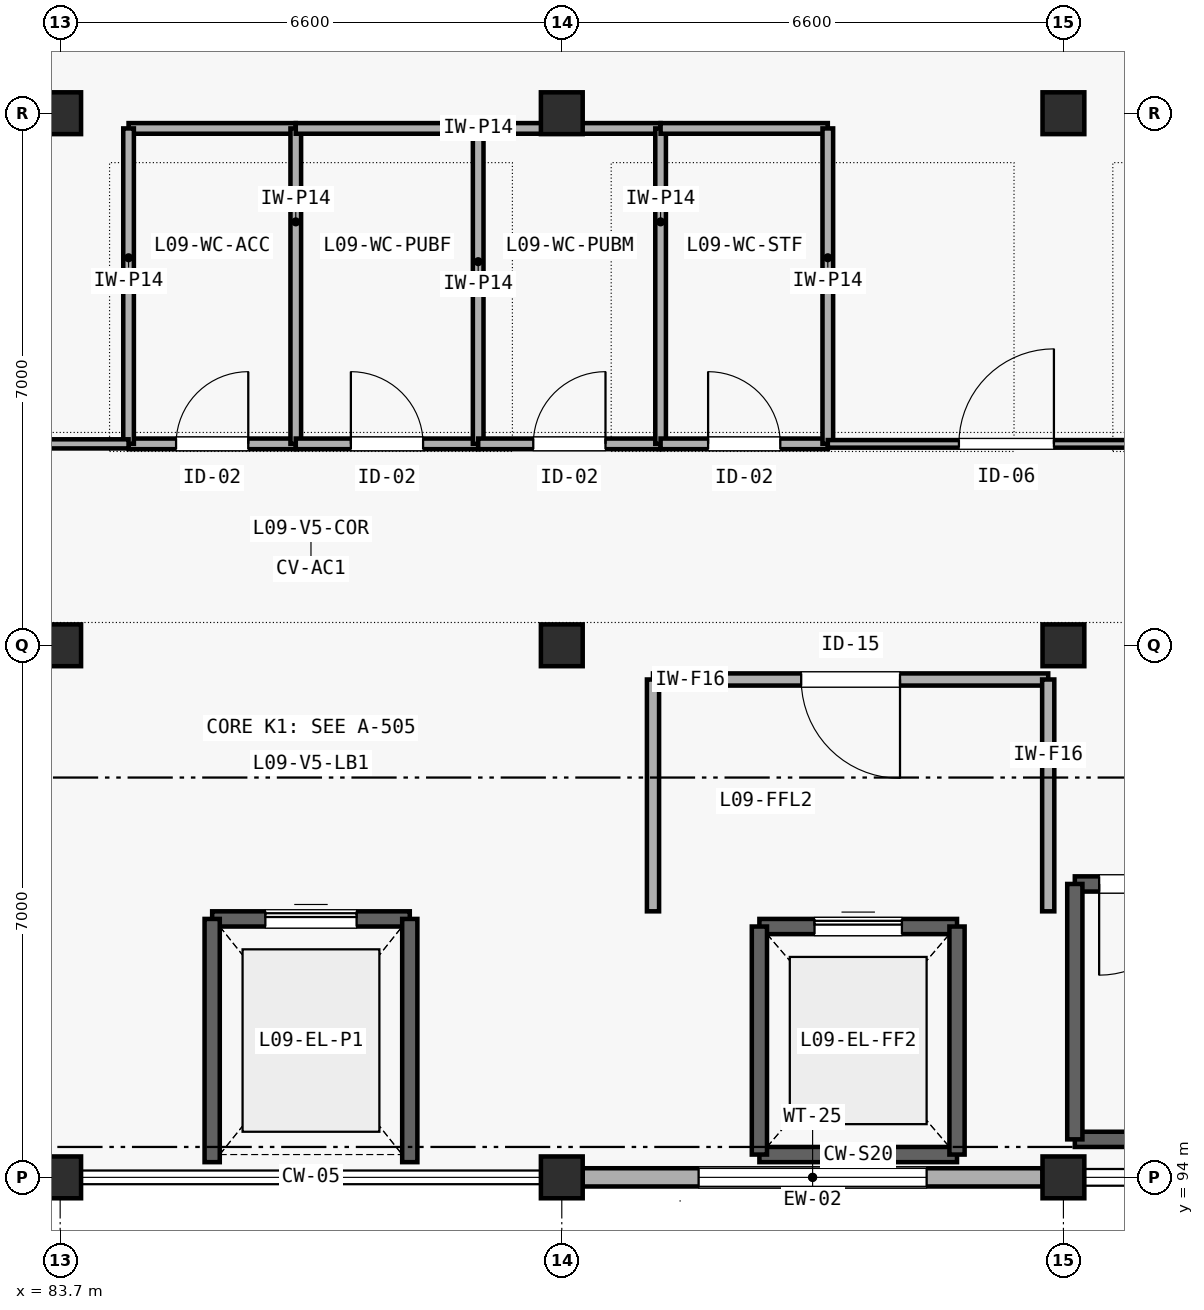
"""IFC4 building model, lengths in metres.
Left out: names, types, materials, properties, quantities, classifications, styles, units other than length and angle.
Written with IfcOpenShell. Run it as: python <this file> out.ifc"""

import sys

from ifc_helpers import new_model, si_unit, direction, frame, frame_2d, origin, origin_2d, place, context, subcontext, project, spatial, rectangle, extrude, element, fill, save


model = new_model("IFC4")
c1 = context("Model", 3, precision=1e-05, world=origin(), true_north=direction((0.0, 1.0)))
c2 = subcontext(c1, "Body", "Model", "MODEL_VIEW")
j1 = project(units=[si_unit("LENGTHUNIT", "METRE"), si_unit("PLANEANGLEUNIT", "RADIAN")], contexts=[c1])
p1 = place(None, origin())
s1 = spatial("IfcSite", under=j1, at=p1, CompositionType="ELEMENT")
p2 = place(p1, origin())
s2 = spatial("IfcBuilding", under=s1, at=p2, CompositionType="ELEMENT")
p3 = place(p2, frame((0.0, 0.0, 37.8)))
s3 = spatial("IfcBuildingStorey", under=s2, at=p3, CompositionType="ELEMENT", Elevation=37.8)
for number, where, z_axis, x_axis in (
    (1, (83.7, 94.0, 0.0), (0.0, 0.0, 1.0), (1.0, 0.0, 0.0)),
    (2, (83.7, 101.0, 0.0), (0.0, 0.0, 1.0), (1.0, 0.0, 0.0)),
    (3, (83.7, 108.0, 0.0), (0.0, 0.0, 1.0), (1.0, 0.0, 0.0)),
    (4, (90.3, 94.0, 0.0), (0.0, 0.0, 1.0), (1.0, 0.0, 0.0)),
    (5, (90.3, 101.0, 0.0), (0.0, 0.0, 1.0), (1.0, 0.0, 0.0)),
    (6, (90.3, 108.0, 0.0), (0.0, 0.0, 1.0), (1.0, 0.0, 0.0)),
    (7, (96.9, 94.0, 0.0), (0.0, 0.0, 1.0), (1.0, 0.0, 0.0)),
    (8, (96.9, 101.0, 0.0), (0.0, 0.0, 1.0), (1.0, 0.0, 0.0)),
    (9, (96.9, 108.0, 0.0), (0.0, 0.0, 1.0), (1.0, 0.0, 0.0)),
):
    element("IfcColumn", number, at=place(p3, frame(where, z_axis=z_axis, x_axis=x_axis)), inside=s3, PredefinedType="COLUMN", context=c2, shape_type="SweptSolid", body=[
        extrude(rectangle(XDim=0.55, YDim=0.55, at=origin_2d()), origin(), (0.0, 0.0, 1.0), 4.2),
    ])
p4 = place(p3, frame((90.575, 94.0, 0.0), z_axis=(0.0, 0.0, 1.0), x_axis=(1.0, 0.0, 0.0)))
e10 = element("IfcWall", 10, at=p4, inside=s3, PredefinedType="SOLIDWALL", context=c2, shape_type="SweptSolid", body=[
    extrude(rectangle(XDim=6.05, YDim=0.24, at=frame_2d((3.025, 0.0))), origin(), (0.0, 0.0, 1.0), 3.385),
])
p5 = place(p4, frame((1.525, 0.0, 0.85)))
e11 = element("IfcOpeningElement", 11, at=p5, cuts=e10, PredefinedType="OPENING", context=c2, shape_type="SweptSolid", body=[
    extrude(rectangle(XDim=3.0, YDim=1.6, at=frame_2d((1.5, 0.8))), frame((0.0, 0.13, 0.0), z_axis=(0.0, -1.0, 0.0), x_axis=(1.0, 0.0, 0.0)), (0.0, 0.0, 1.0), 0.26),
])
p6 = place(p3, frame((97.05, 94.5, 0.0), z_axis=(0.0, 0.0, 1.0), x_axis=(1.0, 0.0, 0.0)))
e12 = element("IfcWall", 12, at=p6, inside=s3, PredefinedType="SHEAR", context=c2, shape_type="SweptSolid", body=[
    extrude(rectangle(XDim=6.3, YDim=0.2, at=frame_2d((3.15, 0.0))), origin(), (0.0, 0.0, 1.0), 4.2),
])
p7 = place(p3, frame((97.05, 97.86, 0.0), z_axis=(0.0, 0.0, 1.0), x_axis=(1.0, 0.0, 0.0)))
e13 = element("IfcWall", 13, at=p7, inside=s3, PredefinedType="SHEAR", context=c2, shape_type="SweptSolid", body=[
    extrude(rectangle(XDim=6.3, YDim=0.2, at=frame_2d((3.15, 0.0))), origin(), (0.0, 0.0, 1.0), 4.2),
])
p8 = place(p7, frame((0.32, 0.0, 0.0)))
e14 = element("IfcOpeningElement", 14, at=p8, cuts=e13, PredefinedType="OPENING", context=c2, shape_type="SweptSolid", body=[
    extrude(rectangle(XDim=1.2, YDim=2.15, at=frame_2d((0.6, 1.075))), frame((0.0, 0.11, 0.0), z_axis=(0.0, -1.0, 0.0), x_axis=(1.0, 0.0, 0.0)), (0.0, 0.0, 1.0), 0.22),
])
p9 = place(p3, frame((97.05, 94.5, 0.0), z_axis=(0.0, 0.0, 1.0), x_axis=(0.0, 1.0, 0.0)))
e15 = element("IfcWall", 15, at=p9, inside=s3, PredefinedType="SHEAR", context=c2, shape_type="SweptSolid", body=[
    extrude(rectangle(XDim=3.36, YDim=0.2, at=frame_2d((1.68, 0.0))), origin(), (0.0, 0.0, 1.0), 4.2),
])
p10 = place(p3, frame((92.9, 94.3, 0.0), z_axis=(0.0, 0.0, 1.0), x_axis=(1.0, 0.0, 0.0)))
e16 = element("IfcWall", 16, at=p10, inside=s3, PredefinedType="SHEAR", context=c2, shape_type="SweptSolid", body=[
    extrude(rectangle(XDim=2.6, YDim=0.2, at=frame_2d((1.3, 0.0))), origin(), (0.0, 0.0, 1.0), 4.2),
])
p11 = place(p3, frame((92.9, 97.3, 0.0), z_axis=(0.0, 0.0, 1.0), x_axis=(1.0, 0.0, 0.0)))
e17 = element("IfcWall", 17, at=p11, inside=s3, PredefinedType="SHEAR", context=c2, shape_type="SweptSolid", body=[
    extrude(rectangle(XDim=2.6, YDim=0.2, at=frame_2d((1.3, 0.0))), origin(), (0.0, 0.0, 1.0), 4.2),
])
p12 = place(p11, frame((0.725, 0.0, 0.0)))
e18 = element("IfcOpeningElement", 18, at=p12, cuts=e17, PredefinedType="OPENING", context=c2, shape_type="SweptSolid", body=[
    extrude(rectangle(XDim=1.15, YDim=2.2, at=frame_2d((0.575, 1.1))), frame((0.0, 0.11, 0.0), z_axis=(0.0, -1.0, 0.0), x_axis=(1.0, 0.0, 0.0)), (0.0, 0.0, 1.0), 0.22),
])
for number, where, z_axis, x_axis in (
    (19, (92.9, 94.3, 0.0), (0.0, 0.0, 1.0), (0.0, 1.0, 0.0)),
    (20, (95.5, 94.3, 0.0), (0.0, 0.0, 1.0), (0.0, 1.0, 0.0)),
):
    element("IfcWall", number, at=place(p3, frame(where, z_axis=z_axis, x_axis=x_axis)), inside=s3, PredefinedType="SHEAR", context=c2, shape_type="SweptSolid", body=[
        extrude(rectangle(XDim=3.0, YDim=0.2, at=frame_2d((1.5, 0.0))), origin(), (0.0, 0.0, 1.0), 4.2),
    ])
p13 = place(p3, frame((85.7, 97.4, 0.0), z_axis=(0.0, 0.0, 1.0), x_axis=(1.0, 0.0, 0.0)))
e21 = element("IfcWall", 21, at=p13, inside=s3, PredefinedType="SHEAR", context=c2, shape_type="SweptSolid", body=[
    extrude(rectangle(XDim=2.6, YDim=0.2, at=frame_2d((1.3, 0.0))), origin(), (0.0, 0.0, 1.0), 4.2),
])
p14 = place(p13, frame((0.7, 0.0, 0.0)))
e22 = element("IfcOpeningElement", 22, at=p14, cuts=e21, PredefinedType="OPENING", context=c2, shape_type="SweptSolid", body=[
    extrude(rectangle(XDim=1.2, YDim=2.2, at=frame_2d((0.6, 1.1))), frame((0.0, 0.11, 0.0), z_axis=(0.0, -1.0, 0.0), x_axis=(1.0, 0.0, 0.0)), (0.0, 0.0, 1.0), 0.22),
])
for number, where, z_axis, x_axis in (
    (23, (85.7, 94.2, 0.0), (0.0, 0.0, 1.0), (0.0, 1.0, 0.0)),
    (24, (88.3, 94.2, 0.0), (0.0, 0.0, 1.0), (0.0, 1.0, 0.0)),
):
    element("IfcWall", number, at=place(p3, frame(where, z_axis=z_axis, x_axis=x_axis)), inside=s3, PredefinedType="SHEAR", context=c2, shape_type="SweptSolid", body=[
        extrude(rectangle(XDim=3.2, YDim=0.2, at=frame_2d((1.6, 0.0))), origin(), (0.0, 0.0, 1.0), 4.2),
    ])
p15 = place(p3, frame((91.5, 100.55, 0.0), z_axis=(0.0, 0.0, 1.0), x_axis=(1.0, 0.0, 0.0)))
e25 = element("IfcWall", 25, at=p15, inside=s3, PredefinedType="SOLIDWALL", context=c2, shape_type="SweptSolid", body=[
    extrude(rectangle(XDim=5.2, YDim=0.16, at=frame_2d((2.6, 0.0))), origin(), (0.0, 0.0, 1.0), 3.9),
])
p16 = place(p15, frame((1.95, 0.0, 0.0)))
e26 = element("IfcOpeningElement", 26, at=p16, cuts=e25, PredefinedType="OPENING", context=c2, shape_type="SweptSolid", body=[
    extrude(rectangle(XDim=1.3, YDim=2.15, at=frame_2d((0.65, 1.075))), frame((0.0, 0.09, 0.0), z_axis=(0.0, -1.0, 0.0), x_axis=(1.0, 0.0, 0.0)), (0.0, 0.0, 1.0), 0.18),
])
p17 = place(p3, frame((91.5, 97.5, 0.0), z_axis=(0.0, 0.0, 1.0), x_axis=(0.0, 1.0, 0.0)))
e27 = element("IfcWall", 27, at=p17, inside=s3, PredefinedType="SOLIDWALL", context=c2, shape_type="SweptSolid", body=[
    extrude(rectangle(XDim=3.05, YDim=0.16, at=frame_2d((1.525, 0.0))), origin(), (0.0, 0.0, 1.0), 3.9),
])
p18 = place(p3, frame((96.7, 97.5, 0.0), z_axis=(0.0, 0.0, 1.0), x_axis=(0.0, 1.0, 0.0)))
e28 = element("IfcWall", 28, at=p18, inside=s3, PredefinedType="SOLIDWALL", context=c2, shape_type="SweptSolid", body=[
    extrude(rectangle(XDim=3.05, YDim=0.16, at=frame_2d((1.525, 0.0))), origin(), (0.0, 0.0, 1.0), 3.405),
])
p19 = place(p3, frame((84.6, 103.65, 0.0), z_axis=(0.0, 0.0, 1.0), x_axis=(1.0, 0.0, 0.0)))
e29 = element("IfcWall", 29, at=p19, inside=s3, PredefinedType="PLUMBINGWALL", context=c2, shape_type="SweptSolid", body=[
    extrude(rectangle(XDim=2.2, YDim=0.14, at=frame_2d((1.1, 0.0))), origin(), (0.0, 0.0, 1.0), 3.9),
])
p20 = place(p19, frame((0.625, 0.0, 0.0)))
e30 = element("IfcOpeningElement", 30, at=p20, cuts=e29, PredefinedType="OPENING", context=c2, shape_type="SweptSolid", body=[
    extrude(rectangle(XDim=0.95, YDim=2.1, at=frame_2d((0.475, 1.05))), frame((0.0, 0.08, 0.0), z_axis=(0.0, -1.0, 0.0), x_axis=(1.0, 0.0, 0.0)), (0.0, 0.0, 1.0), 0.16),
])
p21 = place(p3, frame((84.6, 107.8, 0.0), z_axis=(0.0, 0.0, 1.0), x_axis=(1.0, 0.0, 0.0)))
e31 = element("IfcWall", 31, at=p21, inside=s3, PredefinedType="PLUMBINGWALL", context=c2, shape_type="SweptSolid", body=[
    extrude(rectangle(XDim=2.2, YDim=0.14, at=frame_2d((1.1, 0.0))), origin(), (0.0, 0.0, 1.0), 3.385),
])
for number, where, z_axis, x_axis in (
    (32, (84.6, 103.65, 0.0), (0.0, 0.0, 1.0), (0.0, 1.0, 0.0)),
    (33, (86.8, 103.65, 0.0), (0.0, 0.0, 1.0), (0.0, 1.0, 0.0)),
):
    element("IfcWall", number, at=place(p3, frame(where, z_axis=z_axis, x_axis=x_axis)), inside=s3, PredefinedType="PLUMBINGWALL", context=c2, shape_type="SweptSolid", body=[
        extrude(rectangle(XDim=4.15, YDim=0.14, at=frame_2d((2.075, 0.0))), origin(), (0.0, 0.0, 1.0), 3.9),
    ])
p22 = place(p3, frame((86.8, 103.65, 0.0), z_axis=(0.0, 0.0, 1.0), x_axis=(1.0, 0.0, 0.0)))
e34 = element("IfcWall", 34, at=p22, inside=s3, PredefinedType="PLUMBINGWALL", context=c2, shape_type="SweptSolid", body=[
    extrude(rectangle(XDim=2.4, YDim=0.14, at=frame_2d((1.2, 0.0))), origin(), (0.0, 0.0, 1.0), 3.9),
])
p23 = place(p22, frame((0.725, 0.0, 0.0)))
e35 = element("IfcOpeningElement", 35, at=p23, cuts=e34, PredefinedType="OPENING", context=c2, shape_type="SweptSolid", body=[
    extrude(rectangle(XDim=0.95, YDim=2.1, at=frame_2d((0.475, 1.05))), frame((0.0, 0.08, 0.0), z_axis=(0.0, -1.0, 0.0), x_axis=(1.0, 0.0, 0.0)), (0.0, 0.0, 1.0), 0.16),
])
p24 = place(p3, frame((86.8, 107.8, 0.0), z_axis=(0.0, 0.0, 1.0), x_axis=(1.0, 0.0, 0.0)))
e36 = element("IfcWall", 36, at=p24, inside=s3, PredefinedType="PLUMBINGWALL", context=c2, shape_type="SweptSolid", body=[
    extrude(rectangle(XDim=2.4, YDim=0.14, at=frame_2d((1.2, 0.0))), origin(), (0.0, 0.0, 1.0), 3.385),
])
p25 = place(p3, frame((89.2, 103.65, 0.0), z_axis=(0.0, 0.0, 1.0), x_axis=(0.0, 1.0, 0.0)))
e37 = element("IfcWall", 37, at=p25, inside=s3, PredefinedType="PLUMBINGWALL", context=c2, shape_type="SweptSolid", body=[
    extrude(rectangle(XDim=4.15, YDim=0.14, at=frame_2d((2.075, 0.0))), origin(), (0.0, 0.0, 1.0), 3.9),
])
p26 = place(p3, frame((89.2, 103.65, 0.0), z_axis=(0.0, 0.0, 1.0), x_axis=(1.0, 0.0, 0.0)))
e38 = element("IfcWall", 38, at=p26, inside=s3, PredefinedType="PLUMBINGWALL", context=c2, shape_type="SweptSolid", body=[
    extrude(rectangle(XDim=2.4, YDim=0.14, at=frame_2d((1.2, 0.0))), origin(), (0.0, 0.0, 1.0), 3.9),
])
p27 = place(p26, frame((0.725, 0.0, 0.0)))
e39 = element("IfcOpeningElement", 39, at=p27, cuts=e38, PredefinedType="OPENING", context=c2, shape_type="SweptSolid", body=[
    extrude(rectangle(XDim=0.95, YDim=2.1, at=frame_2d((0.475, 1.05))), frame((0.0, 0.08, 0.0), z_axis=(0.0, -1.0, 0.0), x_axis=(1.0, 0.0, 0.0)), (0.0, 0.0, 1.0), 0.16),
])
p28 = place(p3, frame((89.2, 107.8, 0.0), z_axis=(0.0, 0.0, 1.0), x_axis=(1.0, 0.0, 0.0)))
e40 = element("IfcWall", 40, at=p28, inside=s3, PredefinedType="PLUMBINGWALL", context=c2, shape_type="SweptSolid", body=[
    extrude(rectangle(XDim=2.4, YDim=0.14, at=frame_2d((1.2, 0.0))), origin(), (0.0, 0.0, 1.0), 3.385),
])
p29 = place(p3, frame((91.6, 103.65, 0.0), z_axis=(0.0, 0.0, 1.0), x_axis=(0.0, 1.0, 0.0)))
e41 = element("IfcWall", 41, at=p29, inside=s3, PredefinedType="PLUMBINGWALL", context=c2, shape_type="SweptSolid", body=[
    extrude(rectangle(XDim=4.15, YDim=0.14, at=frame_2d((2.075, 0.0))), origin(), (0.0, 0.0, 1.0), 3.9),
])
p30 = place(p3, frame((91.6, 103.65, 0.0), z_axis=(0.0, 0.0, 1.0), x_axis=(1.0, 0.0, 0.0)))
e42 = element("IfcWall", 42, at=p30, inside=s3, PredefinedType="PLUMBINGWALL", context=c2, shape_type="SweptSolid", body=[
    extrude(rectangle(XDim=2.2, YDim=0.14, at=frame_2d((1.1, 0.0))), origin(), (0.0, 0.0, 1.0), 3.9),
])
p31 = place(p30, frame((0.625, 0.0, 0.0)))
e43 = element("IfcOpeningElement", 43, at=p31, cuts=e42, PredefinedType="OPENING", context=c2, shape_type="SweptSolid", body=[
    extrude(rectangle(XDim=0.95, YDim=2.1, at=frame_2d((0.475, 1.05))), frame((0.0, 0.08, 0.0), z_axis=(0.0, -1.0, 0.0), x_axis=(1.0, 0.0, 0.0)), (0.0, 0.0, 1.0), 0.16),
])
p32 = place(p3, frame((91.6, 107.8, 0.0), z_axis=(0.0, 0.0, 1.0), x_axis=(1.0, 0.0, 0.0)))
e44 = element("IfcWall", 44, at=p32, inside=s3, PredefinedType="PLUMBINGWALL", context=c2, shape_type="SweptSolid", body=[
    extrude(rectangle(XDim=2.2, YDim=0.14, at=frame_2d((1.1, 0.0))), origin(), (0.0, 0.0, 1.0), 3.385),
])
p33 = place(p3, frame((93.8, 103.65, 0.0), z_axis=(0.0, 0.0, 1.0), x_axis=(0.0, 1.0, 0.0)))
e45 = element("IfcWall", 45, at=p33, inside=s3, PredefinedType="PLUMBINGWALL", context=c2, shape_type="SweptSolid", body=[
    extrude(rectangle(XDim=4.15, YDim=0.14, at=frame_2d((2.075, 0.0))), origin(), (0.0, 0.0, 1.0), 3.9),
])
p34 = place(p3, frame((76.8, 103.65, 0.0), z_axis=(0.0, 0.0, 1.0), x_axis=(1.0, 0.0, 0.0)))
e46 = element("IfcWall", 46, at=p34, inside=s3, PredefinedType="PARTITIONING", context=c2, shape_type="SweptSolid", body=[
    extrude(rectangle(XDim=7.8, YDim=0.12, at=frame_2d((3.9, 0.0))), origin(), (0.0, 0.0, 1.0), 3.9),
])
p35 = place(p34, frame((3.325, 0.0, 0.0)))
e47 = element("IfcOpeningElement", 47, at=p35, cuts=e46, PredefinedType="OPENING", context=c2, shape_type="SweptSolid", body=[
    extrude(rectangle(XDim=1.15, YDim=2.15, at=frame_2d((0.575, 1.075))), frame((0.0, 0.07, 0.0), z_axis=(0.0, -1.0, 0.0), x_axis=(1.0, 0.0, 0.0)), (0.0, 0.0, 1.0), 0.14),
])
p36 = place(p3, frame((93.8, 103.65, 0.0), z_axis=(0.0, 0.0, 1.0), x_axis=(1.0, 0.0, 0.0)))
e48 = element("IfcWall", 48, at=p36, inside=s3, PredefinedType="PARTITIONING", context=c2, shape_type="SweptSolid", body=[
    extrude(rectangle(XDim=4.7, YDim=0.1, at=frame_2d((2.35, 0.0))), origin(), (0.0, 0.0, 1.0), 3.9),
])
p37 = place(p36, frame((1.725, 0.0, 0.0)))
e49 = element("IfcOpeningElement", 49, at=p37, cuts=e48, PredefinedType="OPENING", context=c2, shape_type="SweptSolid", body=[
    extrude(rectangle(XDim=1.25, YDim=2.15, at=frame_2d((0.625, 1.075))), frame((0.0, 0.06, 0.0), z_axis=(0.0, -1.0, 0.0), x_axis=(1.0, 0.0, 0.0)), (0.0, 0.0, 1.0), 0.12),
])
p38 = place(p5, origin())
e50 = element("IfcWindow", 50, at=p38, inside=s3, PartitioningType="SINGLE_PANEL", PredefinedType="WINDOW", context=c2, shape_type="SweptSolid", body=[
    extrude(rectangle(XDim=3.0, YDim=1.6, at=frame_2d((1.5, 0.8))), frame((0.0, 0.03, 0.0), z_axis=(0.0, -1.0, 0.0), x_axis=(1.0, 0.0, 0.0)), (0.0, 0.0, 1.0), 0.06),
])
fill(e11, e50)
p39 = place(p8, frame((1.2, 0.0, 0.0), z_axis=(0.0, 0.0, 1.0), x_axis=(-1.0, 0.0, 0.0)))
e51 = element("IfcDoor", 51, at=p39, inside=s3, OperationType="SINGLE_SWING_RIGHT", PredefinedType="DOOR", context=c2, shape_type="SweptSolid", body=[
    extrude(rectangle(XDim=1.2, YDim=2.15, at=frame_2d((0.6, 1.075))), frame((0.0, 0.025, 0.0), z_axis=(0.0, -1.0, 0.0), x_axis=(1.0, 0.0, 0.0)), (0.0, 0.0, 1.0), 0.05),
])
fill(e14, e51)
p40 = place(p12, origin())
e52 = element("IfcDoor", 52, at=p40, inside=s3, OperationType="SLIDING_TO_LEFT", PredefinedType="DOOR", context=c2, shape_type="SweptSolid", body=[
    extrude(rectangle(XDim=1.15, YDim=2.2, at=frame_2d((0.575, 1.1))), frame((0.0, 0.025, 0.0), z_axis=(0.0, -1.0, 0.0), x_axis=(1.0, 0.0, 0.0)), (0.0, 0.0, 1.0), 0.05),
])
fill(e18, e52)
p41 = place(p14, origin())
e53 = element("IfcDoor", 53, at=p41, inside=s3, OperationType="SLIDING_TO_LEFT", PredefinedType="DOOR", context=c2, shape_type="SweptSolid", body=[
    extrude(rectangle(XDim=1.2, YDim=2.2, at=frame_2d((0.6, 1.1))), frame((0.0, 0.025, 0.0), z_axis=(0.0, -1.0, 0.0), x_axis=(1.0, 0.0, 0.0)), (0.0, 0.0, 1.0), 0.05),
])
fill(e22, e53)
p42 = place(p16, frame((1.3, 0.0, 0.0), z_axis=(0.0, 0.0, 1.0), x_axis=(-1.0, 0.0, 0.0)))
e54 = element("IfcDoor", 54, at=p42, inside=s3, OperationType="SINGLE_SWING_LEFT", PredefinedType="DOOR", context=c2, shape_type="SweptSolid", body=[
    extrude(rectangle(XDim=1.3, YDim=2.15, at=frame_2d((0.65, 1.075))), frame((0.0, 0.025, 0.0), z_axis=(0.0, -1.0, 0.0), x_axis=(1.0, 0.0, 0.0)), (0.0, 0.0, 1.0), 0.05),
])
fill(e26, e54)
p43 = place(p20, origin())
e55 = element("IfcDoor", 55, at=p43, inside=s3, OperationType="SINGLE_SWING_RIGHT", PredefinedType="DOOR", context=c2, shape_type="SweptSolid", body=[
    extrude(rectangle(XDim=0.95, YDim=2.1, at=frame_2d((0.475, 1.05))), frame((0.0, 0.025, 0.0), z_axis=(0.0, -1.0, 0.0), x_axis=(1.0, 0.0, 0.0)), (0.0, 0.0, 1.0), 0.05),
])
fill(e30, e55)
p44 = place(p23, origin())
e56 = element("IfcDoor", 56, at=p44, inside=s3, OperationType="SINGLE_SWING_LEFT", PredefinedType="DOOR", context=c2, shape_type="SweptSolid", body=[
    extrude(rectangle(XDim=0.95, YDim=2.1, at=frame_2d((0.475, 1.05))), frame((0.0, 0.025, 0.0), z_axis=(0.0, -1.0, 0.0), x_axis=(1.0, 0.0, 0.0)), (0.0, 0.0, 1.0), 0.05),
])
fill(e35, e56)
p45 = place(p27, origin())
e57 = element("IfcDoor", 57, at=p45, inside=s3, OperationType="SINGLE_SWING_RIGHT", PredefinedType="DOOR", context=c2, shape_type="SweptSolid", body=[
    extrude(rectangle(XDim=0.95, YDim=2.1, at=frame_2d((0.475, 1.05))), frame((0.0, 0.025, 0.0), z_axis=(0.0, -1.0, 0.0), x_axis=(1.0, 0.0, 0.0)), (0.0, 0.0, 1.0), 0.05),
])
fill(e39, e57)
p46 = place(p31, origin())
e58 = element("IfcDoor", 58, at=p46, inside=s3, OperationType="SINGLE_SWING_LEFT", PredefinedType="DOOR", context=c2, shape_type="SweptSolid", body=[
    extrude(rectangle(XDim=0.95, YDim=2.1, at=frame_2d((0.475, 1.05))), frame((0.0, 0.025, 0.0), z_axis=(0.0, -1.0, 0.0), x_axis=(1.0, 0.0, 0.0)), (0.0, 0.0, 1.0), 0.05),
])
fill(e43, e58)
p47 = place(p37, origin())
e59 = element("IfcDoor", 59, at=p47, inside=s3, OperationType="SINGLE_SWING_RIGHT", PredefinedType="DOOR", context=c2, shape_type="SweptSolid", body=[
    extrude(rectangle(XDim=1.25, YDim=2.15, at=frame_2d((0.625, 1.075))), frame((0.0, 0.025, 0.0), z_axis=(0.0, -1.0, 0.0), x_axis=(1.0, 0.0, 0.0)), (0.0, 0.0, 1.0), 0.05),
])
fill(e49, e59)
save(model, sys.argv[1])
